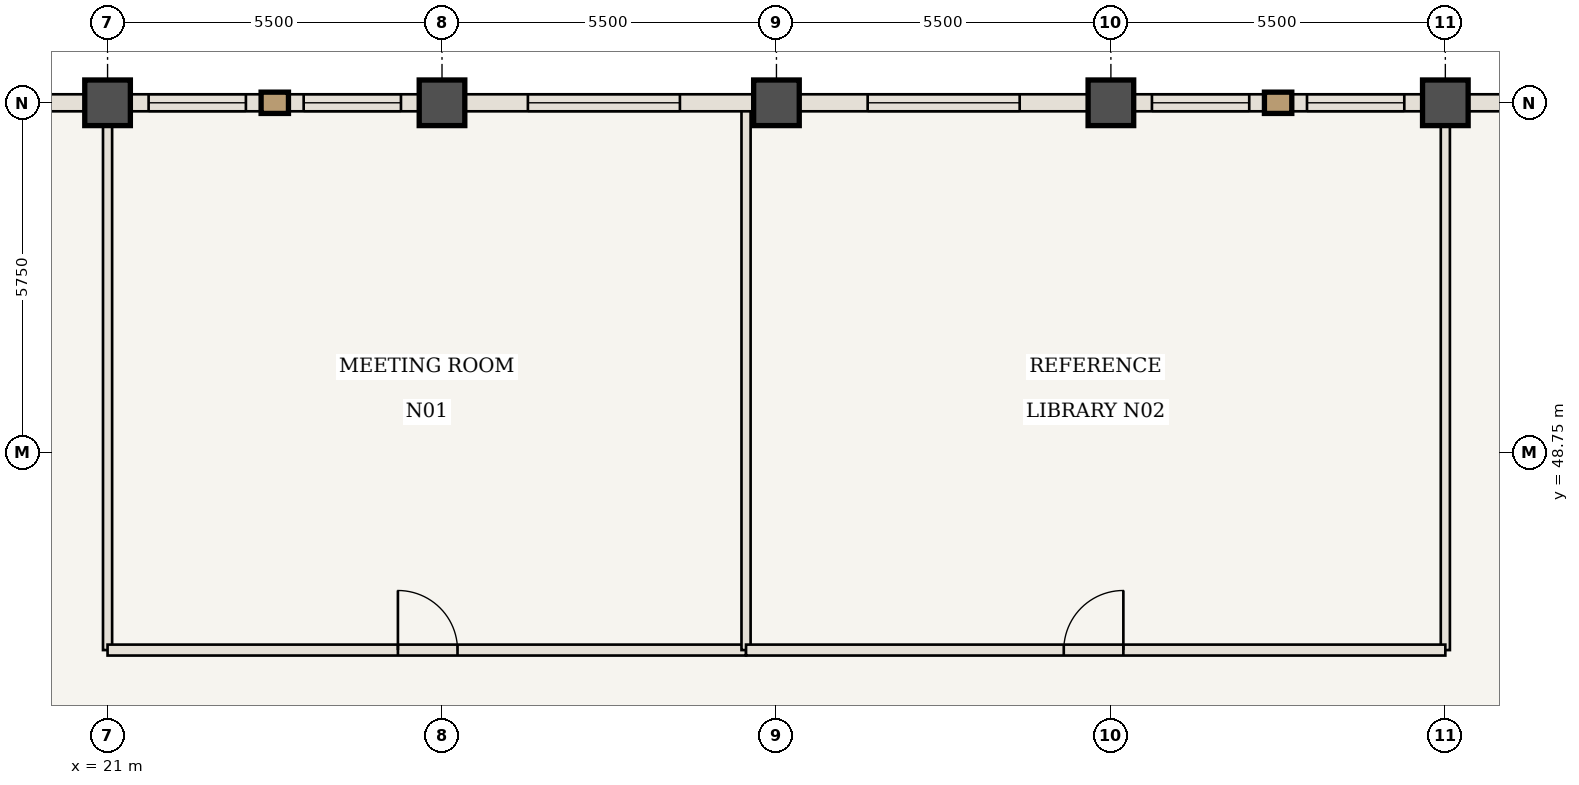
"""IFC4 building model, lengths in metres.
Left out: names, types, materials, properties, quantities, classifications, styles, units other than length and angle.
Written with IfcOpenShell. Run it as: python <this file> out.ifc"""

import sys

from ifc_helpers import new_model, si_unit, direction, frame, frame_2d, origin, origin_2d, place, context, subcontext, project, spatial, rectangle, extrude, element, fill, save


model = new_model("IFC4")
c1 = context("Model", 3, precision=1e-05, world=origin(), true_north=direction((0.0, 1.0)))
c2 = subcontext(c1, "Body", "Model", "MODEL_VIEW")
j1 = project(units=[si_unit("LENGTHUNIT", "METRE"), si_unit("PLANEANGLEUNIT", "RADIAN")], contexts=[c1])
p1 = place(None, origin())
s1 = spatial("IfcSite", under=j1, at=p1, CompositionType="ELEMENT")
p2 = place(p1, origin())
s2 = spatial("IfcBuilding", under=s1, at=p2, CompositionType="ELEMENT")
p3 = place(p2, frame((0.0, 0.0, 269.85)))
s3 = spatial("IfcBuildingStorey", under=s2, at=p3, CompositionType="ELEMENT", Elevation=269.85)
for number, where, z_axis, x_axis in (
    (1, (21.0, 54.5, 0.0), (0.0, 0.0, 1.0), (1.0, 0.0, 0.0)),
    (2, (26.5, 54.5, 0.0), (0.0, 0.0, 1.0), (1.0, 0.0, 0.0)),
    (3, (32.0, 54.5, 0.0), (0.0, 0.0, 1.0), (1.0, 0.0, 0.0)),
    (4, (37.5, 54.5, 0.0), (0.0, 0.0, 1.0), (1.0, 0.0, 0.0)),
    (5, (43.0, 54.5, 0.0), (0.0, 0.0, 1.0), (1.0, 0.0, 0.0)),
):
    element("IfcColumn", number, at=place(p3, frame(where, z_axis=z_axis, x_axis=x_axis)), inside=s3, PredefinedType="COLUMN", context=c2, shape_type="SweptSolid", body=[
        extrude(rectangle(XDim=0.75, YDim=0.75, at=origin_2d()), origin(), (0.0, 0.0, 1.0), 3.85),
    ])
for number, where, z_axis, x_axis in (
    (6, (21.0, 45.5, 0.0), (0.0, 0.0, 1.0), (0.0, 1.0, 0.0)),
    (7, (43.0, 45.5, 0.0), (0.0, 0.0, 1.0), (0.0, 1.0, 0.0)),
):
    element("IfcWall", number, at=place(p3, frame(where, z_axis=z_axis, x_axis=x_axis)), inside=s3, PredefinedType="STANDARD", context=c2, shape_type="SweptSolid", body=[
        extrude(rectangle(XDim=8.94, YDim=0.15, at=frame_2d((4.47, 0.0))), origin(), (0.0, 0.0, 1.0), 3.685),
    ])
p4 = place(p3, frame((21.0, 45.5, 0.0), z_axis=(0.0, 0.0, 1.0), x_axis=(1.0, 0.0, 0.0)))
e8 = element("IfcWall", 8, at=p4, inside=s3, PredefinedType="STANDARD", context=c2, shape_type="SweptSolid", body=[
    extrude(rectangle(XDim=10.5, YDim=0.18, at=frame_2d((5.25, 0.0))), origin(), (0.0, 0.0, 1.0), 3.685),
])
p5 = place(p4, frame((4.775, 0.0, 0.0)))
e9 = element("IfcOpeningElement", 9, at=p5, cuts=e8, PredefinedType="OPENING", context=c2, shape_type="SweptSolid", body=[
    extrude(rectangle(XDim=0.98, YDim=2.2, at=frame_2d((0.49, 1.1))), frame((0.0, 0.1, 0.0), z_axis=(0.0, -1.0, 0.0), x_axis=(1.0, 0.0, 0.0)), (0.0, 0.0, 1.0), 0.2),
])
p6 = place(p3, frame((31.5, 45.5, 0.0), z_axis=(0.0, 0.0, 1.0), x_axis=(0.0, 1.0, 0.0)))
e10 = element("IfcWall", 10, at=p6, inside=s3, PredefinedType="STANDARD", context=c2, shape_type="SweptSolid", body=[
    extrude(rectangle(XDim=8.94, YDim=0.15, at=frame_2d((4.47, 0.0))), origin(), (0.0, 0.0, 1.0), 3.685),
])
p7 = place(p3, frame((31.5, 45.5, 0.0), z_axis=(0.0, 0.0, 1.0), x_axis=(1.0, 0.0, 0.0)))
e11 = element("IfcWall", 11, at=p7, inside=s3, PredefinedType="STANDARD", context=c2, shape_type="SweptSolid", body=[
    extrude(rectangle(XDim=11.5, YDim=0.18, at=frame_2d((5.75, 0.0))), origin(), (0.0, 0.0, 1.0), 3.685),
])
p8 = place(p7, frame((5.225, 0.0, 0.0)))
e12 = element("IfcOpeningElement", 12, at=p8, cuts=e11, PredefinedType="OPENING", context=c2, shape_type="SweptSolid", body=[
    extrude(rectangle(XDim=0.98, YDim=2.2, at=frame_2d((0.49, 1.1))), frame((0.0, 0.1, 0.0), z_axis=(0.0, -1.0, 0.0), x_axis=(1.0, 0.0, 0.0)), (0.0, 0.0, 1.0), 0.2),
])
p9 = place(p3, frame((15.5, 54.5, 0.0), z_axis=(0.0, 0.0, 1.0), x_axis=(1.0, 0.0, 0.0)))
e13 = element("IfcWall", 13, at=p9, inside=s3, PredefinedType="USERDEFINED", context=c2, shape_type="SweptSolid", body=[
    extrude(rectangle(XDim=5.5, YDim=0.28, at=frame_2d((2.75, 0.0))), origin(), (0.0, 0.0, 1.0), 2.985),
])
p10 = place(p3, frame((21.0, 54.5, 0.0), z_axis=(0.0, 0.0, 1.0), x_axis=(1.0, 0.0, 0.0)))
e14 = element("IfcWall", 14, at=p10, inside=s3, PredefinedType="USERDEFINED", context=c2, shape_type="SweptSolid", body=[
    extrude(rectangle(XDim=5.5, YDim=0.28, at=frame_2d((2.75, 0.0))), origin(), (0.0, 0.0, 1.0), 2.985),
])
p11 = place(p10, frame((0.675, 0.0, 0.85)))
e15 = element("IfcOpeningElement", 15, at=p11, cuts=e14, PredefinedType="OPENING", context=c2, shape_type="SweptSolid", body=[
    extrude(rectangle(XDim=1.6, YDim=1.935, at=frame_2d((0.8, 0.968))), frame((0.0, 0.15, 0.0), z_axis=(0.0, -1.0, 0.0), x_axis=(1.0, 0.0, 0.0)), (0.0, 0.0, 1.0), 0.3),
])
p12 = place(p10, frame((3.225, 0.0, 0.85)))
e16 = element("IfcOpeningElement", 16, at=p12, cuts=e14, PredefinedType="OPENING", context=c2, shape_type="SweptSolid", body=[
    extrude(rectangle(XDim=1.6, YDim=1.935, at=frame_2d((0.8, 0.968))), frame((0.0, 0.15, 0.0), z_axis=(0.0, -1.0, 0.0), x_axis=(1.0, 0.0, 0.0)), (0.0, 0.0, 1.0), 0.3),
])
p13 = place(p3, frame((26.5, 54.5, 0.0), z_axis=(0.0, 0.0, 1.0), x_axis=(1.0, 0.0, 0.0)))
e17 = element("IfcWall", 17, at=p13, inside=s3, PredefinedType="USERDEFINED", context=c2, shape_type="SweptSolid", body=[
    extrude(rectangle(XDim=5.5, YDim=0.28, at=frame_2d((2.75, 0.0))), origin(), (0.0, 0.0, 1.0), 2.985),
])
p14 = place(p13, frame((1.413, 0.0, 0.85)))
e18 = element("IfcOpeningElement", 18, at=p14, cuts=e17, PredefinedType="OPENING", context=c2, shape_type="SweptSolid", body=[
    extrude(rectangle(XDim=2.5, YDim=1.935, at=frame_2d((1.25, 0.968))), frame((0.0, 0.15, 0.0), z_axis=(0.0, -1.0, 0.0), x_axis=(1.0, 0.0, 0.0)), (0.0, 0.0, 1.0), 0.3),
])
p15 = place(p3, frame((32.0, 54.5, 0.0), z_axis=(0.0, 0.0, 1.0), x_axis=(1.0, 0.0, 0.0)))
e19 = element("IfcWall", 19, at=p15, inside=s3, PredefinedType="USERDEFINED", context=c2, shape_type="SweptSolid", body=[
    extrude(rectangle(XDim=5.5, YDim=0.28, at=frame_2d((2.75, 0.0))), origin(), (0.0, 0.0, 1.0), 2.985),
])
p16 = place(p15, frame((1.5, 0.0, 0.85)))
e20 = element("IfcOpeningElement", 20, at=p16, cuts=e19, PredefinedType="OPENING", context=c2, shape_type="SweptSolid", body=[
    extrude(rectangle(XDim=2.5, YDim=1.935, at=frame_2d((1.25, 0.968))), frame((0.0, 0.15, 0.0), z_axis=(0.0, -1.0, 0.0), x_axis=(1.0, 0.0, 0.0)), (0.0, 0.0, 1.0), 0.3),
])
p17 = place(p3, frame((37.5, 54.5, 0.0), z_axis=(0.0, 0.0, 1.0), x_axis=(1.0, 0.0, 0.0)))
e21 = element("IfcWall", 21, at=p17, inside=s3, PredefinedType="USERDEFINED", context=c2, shape_type="SweptSolid", body=[
    extrude(rectangle(XDim=5.5, YDim=0.28, at=frame_2d((2.75, 0.0))), origin(), (0.0, 0.0, 1.0), 2.985),
])
p18 = place(p17, frame((0.675, 0.0, 0.85)))
e22 = element("IfcOpeningElement", 22, at=p18, cuts=e21, PredefinedType="OPENING", context=c2, shape_type="SweptSolid", body=[
    extrude(rectangle(XDim=1.6, YDim=1.935, at=frame_2d((0.8, 0.968))), frame((0.0, 0.15, 0.0), z_axis=(0.0, -1.0, 0.0), x_axis=(1.0, 0.0, 0.0)), (0.0, 0.0, 1.0), 0.3),
])
p19 = place(p17, frame((3.225, 0.0, 0.85)))
e23 = element("IfcOpeningElement", 23, at=p19, cuts=e21, PredefinedType="OPENING", context=c2, shape_type="SweptSolid", body=[
    extrude(rectangle(XDim=1.6, YDim=1.935, at=frame_2d((0.8, 0.968))), frame((0.0, 0.15, 0.0), z_axis=(0.0, -1.0, 0.0), x_axis=(1.0, 0.0, 0.0)), (0.0, 0.0, 1.0), 0.3),
])
p20 = place(p3, frame((43.0, 54.5, 0.0), z_axis=(0.0, 0.0, 1.0), x_axis=(1.0, 0.0, 0.0)))
e24 = element("IfcWall", 24, at=p20, inside=s3, PredefinedType="USERDEFINED", context=c2, shape_type="SweptSolid", body=[
    extrude(rectangle(XDim=5.5, YDim=0.28, at=frame_2d((2.75, 0.0))), origin(), (0.0, 0.0, 1.0), 2.985),
])
p21 = place(p5, origin())
e25 = element("IfcDoor", 25, at=p21, inside=s3, OperationType="SINGLE_SWING_LEFT", PredefinedType="DOOR", context=c2, shape_type="SweptSolid", body=[
    extrude(rectangle(XDim=0.98, YDim=2.2, at=frame_2d((0.49, 1.1))), frame((0.0, 0.025, 0.0), z_axis=(0.0, -1.0, 0.0), x_axis=(1.0, 0.0, 0.0)), (0.0, 0.0, 1.0), 0.05),
])
fill(e9, e25)
p22 = place(p8, origin())
e26 = element("IfcDoor", 26, at=p22, inside=s3, OperationType="SINGLE_SWING_RIGHT", PredefinedType="DOOR", context=c2, shape_type="SweptSolid", body=[
    extrude(rectangle(XDim=0.98, YDim=2.2, at=frame_2d((0.49, 1.1))), frame((0.0, 0.025, 0.0), z_axis=(0.0, -1.0, 0.0), x_axis=(1.0, 0.0, 0.0)), (0.0, 0.0, 1.0), 0.05),
])
fill(e12, e26)
p23 = place(p11, origin())
e27 = element("IfcWindow", 27, at=p23, inside=s3, PartitioningType="SINGLE_PANEL", PredefinedType="WINDOW", context=c2, shape_type="SweptSolid", body=[
    extrude(rectangle(XDim=1.6, YDim=1.935, at=frame_2d((0.8, 0.968))), frame((0.0, 0.03, 0.0), z_axis=(0.0, -1.0, 0.0), x_axis=(1.0, 0.0, 0.0)), (0.0, 0.0, 1.0), 0.06),
])
fill(e15, e27)
p24 = place(p12, origin())
e28 = element("IfcWindow", 28, at=p24, inside=s3, PartitioningType="SINGLE_PANEL", PredefinedType="WINDOW", context=c2, shape_type="SweptSolid", body=[
    extrude(rectangle(XDim=1.6, YDim=1.935, at=frame_2d((0.8, 0.968))), frame((0.0, 0.03, 0.0), z_axis=(0.0, -1.0, 0.0), x_axis=(1.0, 0.0, 0.0)), (0.0, 0.0, 1.0), 0.06),
])
fill(e16, e28)
p25 = place(p14, origin())
e29 = element("IfcWindow", 29, at=p25, inside=s3, PartitioningType="SINGLE_PANEL", PredefinedType="WINDOW", context=c2, shape_type="SweptSolid", body=[
    extrude(rectangle(XDim=2.5, YDim=1.935, at=frame_2d((1.25, 0.968))), frame((0.0, 0.03, 0.0), z_axis=(0.0, -1.0, 0.0), x_axis=(1.0, 0.0, 0.0)), (0.0, 0.0, 1.0), 0.06),
])
fill(e18, e29)
p26 = place(p16, origin())
e30 = element("IfcWindow", 30, at=p26, inside=s3, PartitioningType="SINGLE_PANEL", PredefinedType="WINDOW", context=c2, shape_type="SweptSolid", body=[
    extrude(rectangle(XDim=2.5, YDim=1.935, at=frame_2d((1.25, 0.968))), frame((0.0, 0.03, 0.0), z_axis=(0.0, -1.0, 0.0), x_axis=(1.0, 0.0, 0.0)), (0.0, 0.0, 1.0), 0.06),
])
fill(e20, e30)
p27 = place(p18, origin())
e31 = element("IfcWindow", 31, at=p27, inside=s3, PartitioningType="SINGLE_PANEL", PredefinedType="WINDOW", context=c2, shape_type="SweptSolid", body=[
    extrude(rectangle(XDim=1.6, YDim=1.935, at=frame_2d((0.8, 0.968))), frame((0.0, 0.03, 0.0), z_axis=(0.0, -1.0, 0.0), x_axis=(1.0, 0.0, 0.0)), (0.0, 0.0, 1.0), 0.06),
])
fill(e22, e31)
p28 = place(p19, origin())
e32 = element("IfcWindow", 32, at=p28, inside=s3, PartitioningType="SINGLE_PANEL", PredefinedType="WINDOW", context=c2, shape_type="SweptSolid", body=[
    extrude(rectangle(XDim=1.6, YDim=1.935, at=frame_2d((0.8, 0.968))), frame((0.0, 0.03, 0.0), z_axis=(0.0, -1.0, 0.0), x_axis=(1.0, 0.0, 0.0)), (0.0, 0.0, 1.0), 0.06),
])
fill(e23, e32)
save(model, sys.argv[1])
